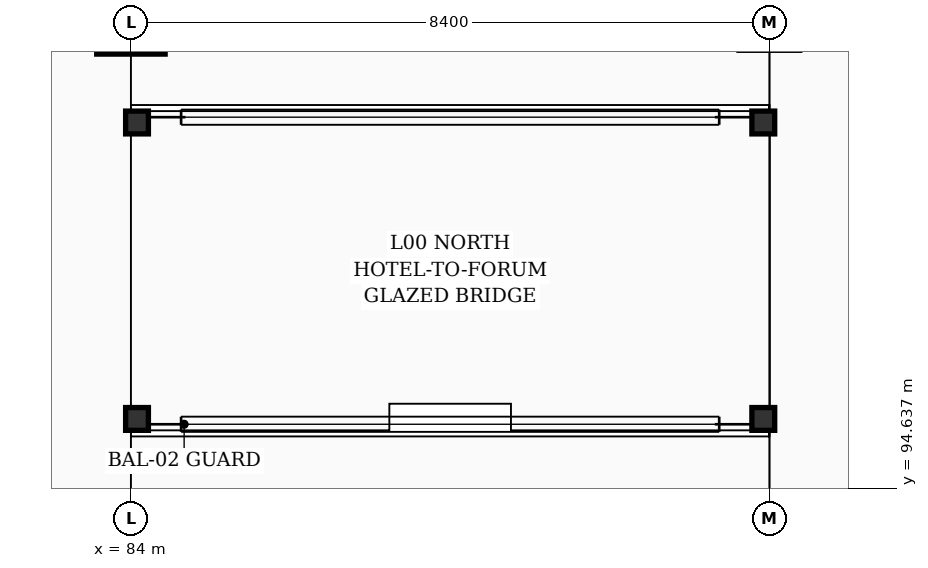
"""IFC4 building model, lengths in metres.
Left out: names, types, materials, properties, quantities, classifications, styles, units other than length and angle.
Written with IfcOpenShell. Run it as: python <this file> out.ifc"""

import sys

from ifc_helpers import new_model, si_unit, direction, frame, origin, origin_2d, place, context, subcontext, project, spatial, rectangle, hollow_rectangle, extrude, element, save


model = new_model("IFC4")
c1 = context("Model", 3, precision=1e-05, world=origin(), true_north=direction((0.0, 1.0)))
c2 = subcontext(c1, "Body", "Model", "MODEL_VIEW")
j1 = project(units=[si_unit("LENGTHUNIT", "METRE"), si_unit("PLANEANGLEUNIT", "RADIAN")], contexts=[c1])
p1 = place(None, origin())
s1 = spatial("IfcSite", under=j1, at=p1, CompositionType="ELEMENT")
p2 = place(p1, origin())
s2 = spatial("IfcBuilding", under=s1, at=p2, CompositionType="ELEMENT")
p3 = place(p2, origin())
s3 = spatial("IfcBuildingStorey", under=s2, at=p3, CompositionType="ELEMENT", Elevation=0.0)
p4 = place(p3, frame((84.0, 100.8, 0.0), z_axis=(0.0, 0.0, 1.0), x_axis=(1.0, 0.0, 0.0)))
e1 = element("IfcColumn", 1, at=p4, inside=s3, PredefinedType="COLUMN", context=c2, shape_type="SweptSolid", body=[
    extrude(rectangle(XDim=0.9, YDim=0.9, at=origin_2d()), origin(), (0.0, 0.0, 1.0), 3.92),
])
for number, where, z_axis, x_axis in (
    (2, (84.08, 95.55, 0.0), (0.0, 0.0, 1.0), (1.0, 0.0, 0.0)),
    (3, (84.08, 99.45, 0.0), (0.0, 0.0, 1.0), (1.0, 0.0, 0.0)),
    (4, (92.32, 95.55, 0.0), (0.0, 0.0, 1.0), (1.0, 0.0, 0.0)),
    (5, (92.32, 99.45, 0.0), (0.0, 0.0, 1.0), (1.0, 0.0, 0.0)),
):
    element("IfcColumn", number, at=place(p3, frame(where, z_axis=z_axis, x_axis=x_axis)), inside=s3, PredefinedType="COLUMN", context=c2, shape_type="SweptSolid", body=[
        extrude(hollow_rectangle(XDim=0.3, YDim=0.3, WallThickness=0.016, at=origin_2d()), origin(), (0.0, 0.0, 1.0), 3.92),
    ])
save(model, sys.argv[1])
